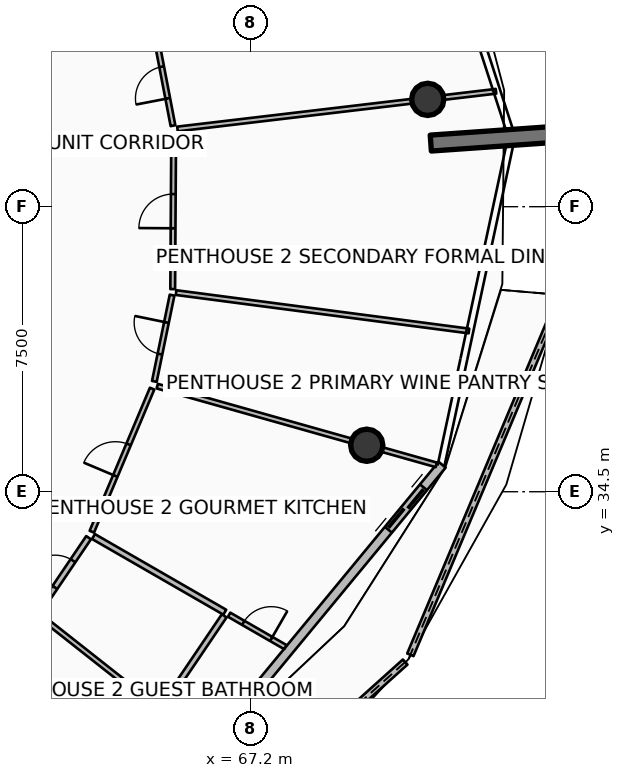
"""IFC4 building model, lengths in metres.
Left out: names, types, materials, properties, quantities, classifications, styles, units other than length and angle.
Written with IfcOpenShell. Run it as: python <this file> out.ifc"""

import sys

from ifc_helpers import new_model, si_unit, direction, frame, frame_2d, origin, origin_2d, place, context, subcontext, project, spatial, polyline, rectangle, circle, outline, extrude, element, fill, save


model = new_model("IFC4")
c1 = context("Model", 3, precision=1e-05, world=origin(), true_north=direction((0.0, 1.0)))
c2 = subcontext(c1, "Body", "Model", "MODEL_VIEW")
j1 = project(units=[si_unit("LENGTHUNIT", "METRE"), si_unit("PLANEANGLEUNIT", "RADIAN")], contexts=[c1])
p1 = place(None, origin())
s1 = spatial("IfcSite", under=j1, at=p1, CompositionType="ELEMENT")
p2 = place(p1, origin())
s2 = spatial("IfcBuilding", under=s1, at=p2, CompositionType="ELEMENT")
p3 = place(p2, frame((0.0, 0.0, 322.1)))
s3 = spatial("IfcBuildingStorey", under=s2, at=p3, CompositionType="ELEMENT", Elevation=322.1)
p4 = place(p3, frame((71.941, 43.674, 0.0), z_axis=(0.0, 0.0, 1.0), x_axis=(0.997564163539, 0.069754853754, 0.0)))
e1 = element("IfcWall", 1, at=p4, inside=s3, PredefinedType="SOLIDWALL", context=c2, shape_type="SweptSolid", body=[
    extrude(rectangle(XDim=3.5, YDim=0.42, at=frame_2d((1.75, 0.0))), origin(), (0.0, 0.0, 1.0), 4.2),
])
for number, where, z_axis, x_axis in (
    (2, (64.626, 28.893, 0.0), (0.0, 0.0, 1.0), (1.0, 0.0, 0.0)),
    (3, (70.256, 35.723, 0.0), (0.0, 0.0, 1.0), (1.0, 0.0, 0.0)),
    (4, (71.86, 44.824, 0.0), (0.0, 0.0, 1.0), (1.0, 0.0, 0.0)),
):
    element("IfcColumn", number, at=place(p3, frame(where, z_axis=z_axis, x_axis=x_axis)), inside=s3, PredefinedType="COLUMN", context=c2, shape_type="SweptSolid", body=[
        extrude(circle(Radius=0.425, at=origin_2d()), origin(), (0.0, 0.0, 1.0), 3.94),
    ])
p5 = place(p3, frame((64.003, 23.493, 0.0), z_axis=(0.0, 0.0, 1.0), x_axis=(0.74390919155, 0.668280715514, 0.0)))
e5 = element("IfcWall", 5, at=p5, inside=s3, PredefinedType="PARAPET", context=c2, shape_type="SweptSolid", body=[
    extrude(outline(polyline([(0.0, 0.0), (9.765, 0.0), (9.765, 1.348), (4.883, 1.562), (0.0, 1.747), (0.0, 0.0)])), frame((0.0, 0.09, 0.0), z_axis=(0.0, -1.0, 0.0), x_axis=(1.0, 0.0, 0.0)), (0.0, 0.0, 1.0), 0.18),
])
p6 = place(p3, frame((71.403, 30.21, 0.0), z_axis=(0.0, 0.0, 1.0), x_axis=(0.38743619069, 0.921896522471, 0.0)))
e6 = element("IfcWall", 6, at=p6, inside=s3, PredefinedType="PARAPET", context=c2, shape_type="SweptSolid", body=[
    extrude(outline(polyline([(0.0, 0.0), (10.269, 0.0), (10.269, 1.12), (5.135, 1.182), (0.0, 1.348), (0.0, 0.0)])), frame((0.0, 0.09, 0.0), z_axis=(0.0, -1.0, 0.0), x_axis=(1.0, 0.0, 0.0)), (0.0, 0.0, 1.0), 0.18),
])
p7 = place(p3, frame((66.045, 27.711, 0.0), z_axis=(0.0, 0.0, 1.0), x_axis=(0.636803612721, 0.771026042897, 0.0)))
e7 = element("IfcWall", 7, at=p7, inside=s3, PredefinedType="SOLIDWALL", context=c2, shape_type="SweptSolid", body=[
    extrude(rectangle(XDim=9.728, YDim=0.24, at=frame_2d((4.864, 0.0))), origin(), (0.0, 0.0, 1.0), 2.89),
])
p8 = place(p7, frame((7.508, 0.0, 0.0)))
e8 = element("IfcOpeningElement", 8, at=p8, cuts=e7, PredefinedType="OPENING", context=c2, shape_type="SweptSolid", body=[
    extrude(rectangle(XDim=1.45, YDim=2.15, at=frame_2d((0.725, 1.075))), frame((0.0, 0.13, 0.0), z_axis=(0.0, -1.0, 0.0), x_axis=(1.0, 0.0, 0.0)), (0.0, 0.0, 1.0), 0.26),
])
p9 = place(p7, frame((0.28, 0.0, 0.65)))
e9 = element("IfcOpeningElement", 9, at=p9, cuts=e7, PredefinedType="OPENING", context=c2, shape_type="SweptSolid", body=[
    extrude(rectangle(XDim=1.6, YDim=1.5, at=frame_2d((0.8, 0.75))), frame((0.0, 0.13, 0.0), z_axis=(0.0, -1.0, 0.0), x_axis=(1.0, 0.0, 0.0)), (0.0, 0.0, 1.0), 0.26),
])
p10 = place(p3, frame((61.661, 31.23, 0.0), z_axis=(0.0, 0.0, 1.0), x_axis=(0.785321366699, -0.61908832246, 0.0)))
e10 = element("IfcWall", 10, at=p10, inside=s3, PredefinedType="PARTITIONING", context=c2, shape_type="SweptSolid", body=[
    extrude(rectangle(XDim=5.597, YDim=0.125, at=frame_2d((2.799, 0.0))), origin(), (0.0, 0.0, 1.0), 3.38),
])
p11 = place(p3, frame((61.639, 31.375, 0.0), z_axis=(0.0, 0.0, 1.0), x_axis=(0.56062651507, 0.828068783738, 0.0)))
e11 = element("IfcWall", 11, at=p11, inside=s3, PredefinedType="PARTITIONING", context=c2, shape_type="SweptSolid", body=[
    extrude(rectangle(XDim=2.314, YDim=0.15, at=frame_2d((1.157, 0.0))), origin(), (0.0, 0.0, 1.0), 3.38),
])
p12 = place(p11, frame((0.732, 0.0, 0.0)))
e12 = element("IfcOpeningElement", 12, at=p12, cuts=e11, PredefinedType="OPENING", context=c2, shape_type="SweptSolid", body=[
    extrude(rectangle(XDim=0.85, YDim=2.06, at=frame_2d((0.425, 1.03))), frame((0.0, 0.085, 0.0), z_axis=(0.0, -1.0, 0.0), x_axis=(1.0, 0.0, 0.0)), (0.0, 0.0, 1.0), 0.17),
])
p13 = place(p3, frame((64.874, 28.825, 0.0), z_axis=(0.0, 0.0, 1.0), x_axis=(0.560532780406, 0.82813223708, 0.0)))
e13 = element("IfcWall", 13, at=p13, inside=s3, PredefinedType="PARTITIONING", context=c2, shape_type="SweptSolid", body=[
    extrude(rectangle(XDim=2.91, YDim=0.15, at=frame_2d((1.455, 0.0))), origin(), (0.0, 0.0, 1.0), 3.38),
])
p14 = place(p3, frame((63.065, 33.321, 0.0), z_axis=(0.0, 0.0, 1.0), x_axis=(0.866490095299, -0.499194265541, 0.0)))
e14 = element("IfcWall", 14, at=p14, inside=s3, PredefinedType="PARTITIONING", context=c2, shape_type="SweptSolid", body=[
    extrude(rectangle(XDim=3.989, YDim=0.15, at=frame_2d((1.994, 0.0))), origin(), (0.0, 0.0, 1.0), 3.38),
])
p15 = place(p3, frame((66.634, 31.265, 0.0), z_axis=(0.0, 0.0, 1.0), x_axis=(0.866444624685, -0.499273184094, 0.0)))
e15 = element("IfcWall", 15, at=p15, inside=s3, PredefinedType="PARTITIONING", context=c2, shape_type="SweptSolid", body=[
    extrude(rectangle(XDim=1.709, YDim=0.125, at=frame_2d((0.855, 0.0))), origin(), (0.0, 0.0, 1.0), 3.38),
])
p16 = place(p15, frame((0.43, 0.0, 0.0)))
e16 = element("IfcOpeningElement", 16, at=p16, cuts=e15, PredefinedType="OPENING", context=c2, shape_type="SweptSolid", body=[
    extrude(rectangle(XDim=0.85, YDim=2.06, at=frame_2d((0.425, 1.03))), frame((0.0, 0.073, 0.0), z_axis=(0.0, -1.0, 0.0), x_axis=(1.0, 0.0, 0.0)), (0.0, 0.0, 1.0), 0.145),
])
p17 = place(p3, frame((63.021, 33.448, 0.0), z_axis=(0.0, 0.0, 1.0), x_axis=(0.388350881923, 0.921511580236, 0.0)))
e17 = element("IfcWall", 17, at=p17, inside=s3, PredefinedType="PARTITIONING", context=c2, shape_type="SweptSolid", body=[
    extrude(rectangle(XDim=4.085, YDim=0.125, at=frame_2d((2.042, 0.0))), origin(), (0.0, 0.0, 1.0), 3.38),
])
p18 = place(p17, frame((1.593, 0.0, 0.0)))
e18 = element("IfcOpeningElement", 18, at=p18, cuts=e17, PredefinedType="OPENING", context=c2, shape_type="SweptSolid", body=[
    extrude(rectangle(XDim=0.9, YDim=2.08, at=frame_2d((0.45, 1.04))), frame((0.0, 0.073, 0.0), z_axis=(0.0, -1.0, 0.0), x_axis=(1.0, 0.0, 0.0)), (0.0, 0.0, 1.0), 0.145),
])
p19 = place(p3, frame((64.743, 37.278, 0.0), z_axis=(0.0, 0.0, 1.0), x_axis=(0.962455248497, -0.271440407162, 0.0)))
e19 = element("IfcWall", 19, at=p19, inside=s3, PredefinedType="PARTITIONING", context=c2, shape_type="SweptSolid", body=[
    extrude(rectangle(XDim=7.631, YDim=0.125, at=frame_2d((3.815, 0.0))), origin(), (0.0, 0.0, 1.0), 3.38),
])
p20 = place(p3, frame((65.238, 39.74, 0.0), z_axis=(0.0, 0.0, 1.0), x_axis=(0.991512783403, -0.130009231784, 0.0)))
e20 = element("IfcWall", 20, at=p20, inside=s3, PredefinedType="PARTITIONING", context=c2, shape_type="SweptSolid", body=[
    extrude(rectangle(XDim=7.772, YDim=0.125, at=frame_2d((3.886, 0.0))), origin(), (0.0, 0.0, 1.0), 3.38),
])
p21 = place(p3, frame((64.667, 37.403, 0.0), z_axis=(0.0, 0.0, 1.0), x_axis=(0.201239677413, 0.979542031888, 0.0)))
e21 = element("IfcWall", 21, at=p21, inside=s3, PredefinedType="PARTITIONING", context=c2, shape_type="SweptSolid", body=[
    extrude(rectangle(XDim=2.317, YDim=0.125, at=frame_2d((1.159, 0.0))), origin(), (0.0, 0.0, 1.0), 3.38),
])
p22 = place(p21, frame((0.734, 0.0, 0.0)))
e22 = element("IfcOpeningElement", 22, at=p22, cuts=e21, PredefinedType="OPENING", context=c2, shape_type="SweptSolid", body=[
    extrude(rectangle(XDim=0.85, YDim=2.06, at=frame_2d((0.425, 1.03))), frame((0.0, 0.073, 0.0), z_axis=(0.0, -1.0, 0.0), x_axis=(1.0, 0.0, 0.0)), (0.0, 0.0, 1.0), 0.145),
])
p23 = place(p3, frame((65.15, 39.831, 0.0), z_axis=(0.0, 0.0, 1.0), x_axis=(0.006309398222, 0.999980095549, 0.0)))
e23 = element("IfcWall", 23, at=p23, inside=s3, PredefinedType="PARTITIONING", context=c2, shape_type="SweptSolid", body=[
    extrude(rectangle(XDim=4.102, YDim=0.125, at=frame_2d((2.051, 0.0))), origin(), (0.0, 0.0, 1.0), 3.38),
])
p24 = place(p23, frame((1.601, 0.0, 0.0)))
e24 = element("IfcOpeningElement", 24, at=p24, cuts=e23, PredefinedType="OPENING", context=c2, shape_type="SweptSolid", body=[
    extrude(rectangle(XDim=0.9, YDim=2.08, at=frame_2d((0.45, 1.04))), frame((0.0, 0.073, 0.0), z_axis=(0.0, -1.0, 0.0), x_axis=(1.0, 0.0, 0.0)), (0.0, 0.0, 1.0), 0.145),
])
p25 = place(p3, frame((65.275, 44.045, 0.0), z_axis=(0.0, 0.0, 1.0), x_axis=(0.993069210767, 0.117531028353, 0.0)))
e25 = element("IfcWall", 25, at=p25, inside=s3, PredefinedType="PARTITIONING", context=c2, shape_type="SweptSolid", body=[
    extrude(rectangle(XDim=8.44, YDim=0.125, at=frame_2d((4.22, 0.0))), origin(), (0.0, 0.0, 1.0), 3.38),
])
p26 = place(p3, frame((65.157, 44.131, 0.0), z_axis=(0.0, 0.0, 1.0), x_axis=(-0.188714144971, 0.982032062352, 0.0)))
e26 = element("IfcWall", 26, at=p26, inside=s3, PredefinedType="PARTITIONING", context=c2, shape_type="SweptSolid", body=[
    extrude(rectangle(XDim=2.311, YDim=0.125, at=frame_2d((1.155, 0.0))), origin(), (0.0, 0.0, 1.0), 3.38),
])
p27 = place(p26, frame((0.73, 0.0, 0.0)))
e27 = element("IfcOpeningElement", 27, at=p27, cuts=e26, PredefinedType="OPENING", context=c2, shape_type="SweptSolid", body=[
    extrude(rectangle(XDim=0.85, YDim=2.06, at=frame_2d((0.425, 1.03))), frame((0.0, 0.073, 0.0), z_axis=(0.0, -1.0, 0.0), x_axis=(1.0, 0.0, 0.0)), (0.0, 0.0, 1.0), 0.145),
])
p28 = place(p8, origin())
e28 = element("IfcDoor", 28, at=p28, inside=s3, OperationType="DOUBLE_DOOR_SLIDING", PredefinedType="DOOR", context=c2, shape_type="SweptSolid", body=[
    extrude(rectangle(XDim=1.45, YDim=2.15, at=frame_2d((0.725, 1.075))), frame((0.0, 0.025, 0.0), z_axis=(0.0, -1.0, 0.0), x_axis=(1.0, 0.0, 0.0)), (0.0, 0.0, 1.0), 0.05),
])
fill(e8, e28)
p29 = place(p9, origin())
e29 = element("IfcWindow", 29, at=p29, inside=s3, PartitioningType="SINGLE_PANEL", PredefinedType="WINDOW", context=c2, shape_type="SweptSolid", body=[
    extrude(rectangle(XDim=1.6, YDim=1.5, at=frame_2d((0.8, 0.75))), frame((0.0, 0.03, 0.0), z_axis=(0.0, -1.0, 0.0), x_axis=(1.0, 0.0, 0.0)), (0.0, 0.0, 1.0), 0.06),
])
fill(e9, e29)
p30 = place(p12, origin())
e30 = element("IfcDoor", 30, at=p30, inside=s3, OperationType="SINGLE_SWING_LEFT", PredefinedType="DOOR", context=c2, shape_type="SweptSolid", body=[
    extrude(rectangle(XDim=0.85, YDim=2.06, at=frame_2d((0.425, 1.03))), frame((0.0, 0.025, 0.0), z_axis=(0.0, -1.0, 0.0), x_axis=(1.0, 0.0, 0.0)), (0.0, 0.0, 1.0), 0.05),
])
fill(e12, e30)
p31 = place(p16, origin())
e31 = element("IfcDoor", 31, at=p31, inside=s3, OperationType="SINGLE_SWING_RIGHT", PredefinedType="DOOR", context=c2, shape_type="SweptSolid", body=[
    extrude(rectangle(XDim=0.85, YDim=2.06, at=frame_2d((0.425, 1.03))), frame((0.0, 0.025, 0.0), z_axis=(0.0, -1.0, 0.0), x_axis=(1.0, 0.0, 0.0)), (0.0, 0.0, 1.0), 0.05),
])
fill(e16, e31)
p32 = place(p18, origin())
e32 = element("IfcDoor", 32, at=p32, inside=s3, OperationType="SINGLE_SWING_LEFT", PredefinedType="DOOR", context=c2, shape_type="SweptSolid", body=[
    extrude(rectangle(XDim=0.9, YDim=2.08, at=frame_2d((0.45, 1.04))), frame((0.0, 0.025, 0.0), z_axis=(0.0, -1.0, 0.0), x_axis=(1.0, 0.0, 0.0)), (0.0, 0.0, 1.0), 0.05),
])
fill(e18, e32)
p33 = place(p22, origin())
e33 = element("IfcDoor", 33, at=p33, inside=s3, OperationType="SINGLE_SWING_RIGHT", PredefinedType="DOOR", context=c2, shape_type="SweptSolid", body=[
    extrude(rectangle(XDim=0.85, YDim=2.06, at=frame_2d((0.425, 1.03))), frame((0.0, 0.025, 0.0), z_axis=(0.0, -1.0, 0.0), x_axis=(1.0, 0.0, 0.0)), (0.0, 0.0, 1.0), 0.05),
])
fill(e22, e33)
p34 = place(p24, origin())
e34 = element("IfcDoor", 34, at=p34, inside=s3, OperationType="SINGLE_SWING_LEFT", PredefinedType="DOOR", context=c2, shape_type="SweptSolid", body=[
    extrude(rectangle(XDim=0.9, YDim=2.08, at=frame_2d((0.45, 1.04))), frame((0.0, 0.025, 0.0), z_axis=(0.0, -1.0, 0.0), x_axis=(1.0, 0.0, 0.0)), (0.0, 0.0, 1.0), 0.05),
])
fill(e24, e34)
p35 = place(p27, origin())
e35 = element("IfcDoor", 35, at=p35, inside=s3, OperationType="SINGLE_SWING_LEFT", PredefinedType="DOOR", context=c2, shape_type="SweptSolid", body=[
    extrude(rectangle(XDim=0.85, YDim=2.06, at=frame_2d((0.425, 1.03))), frame((0.0, 0.025, 0.0), z_axis=(0.0, -1.0, 0.0), x_axis=(1.0, 0.0, 0.0)), (0.0, 0.0, 1.0), 0.05),
])
fill(e27, e35)
save(model, sys.argv[1])
